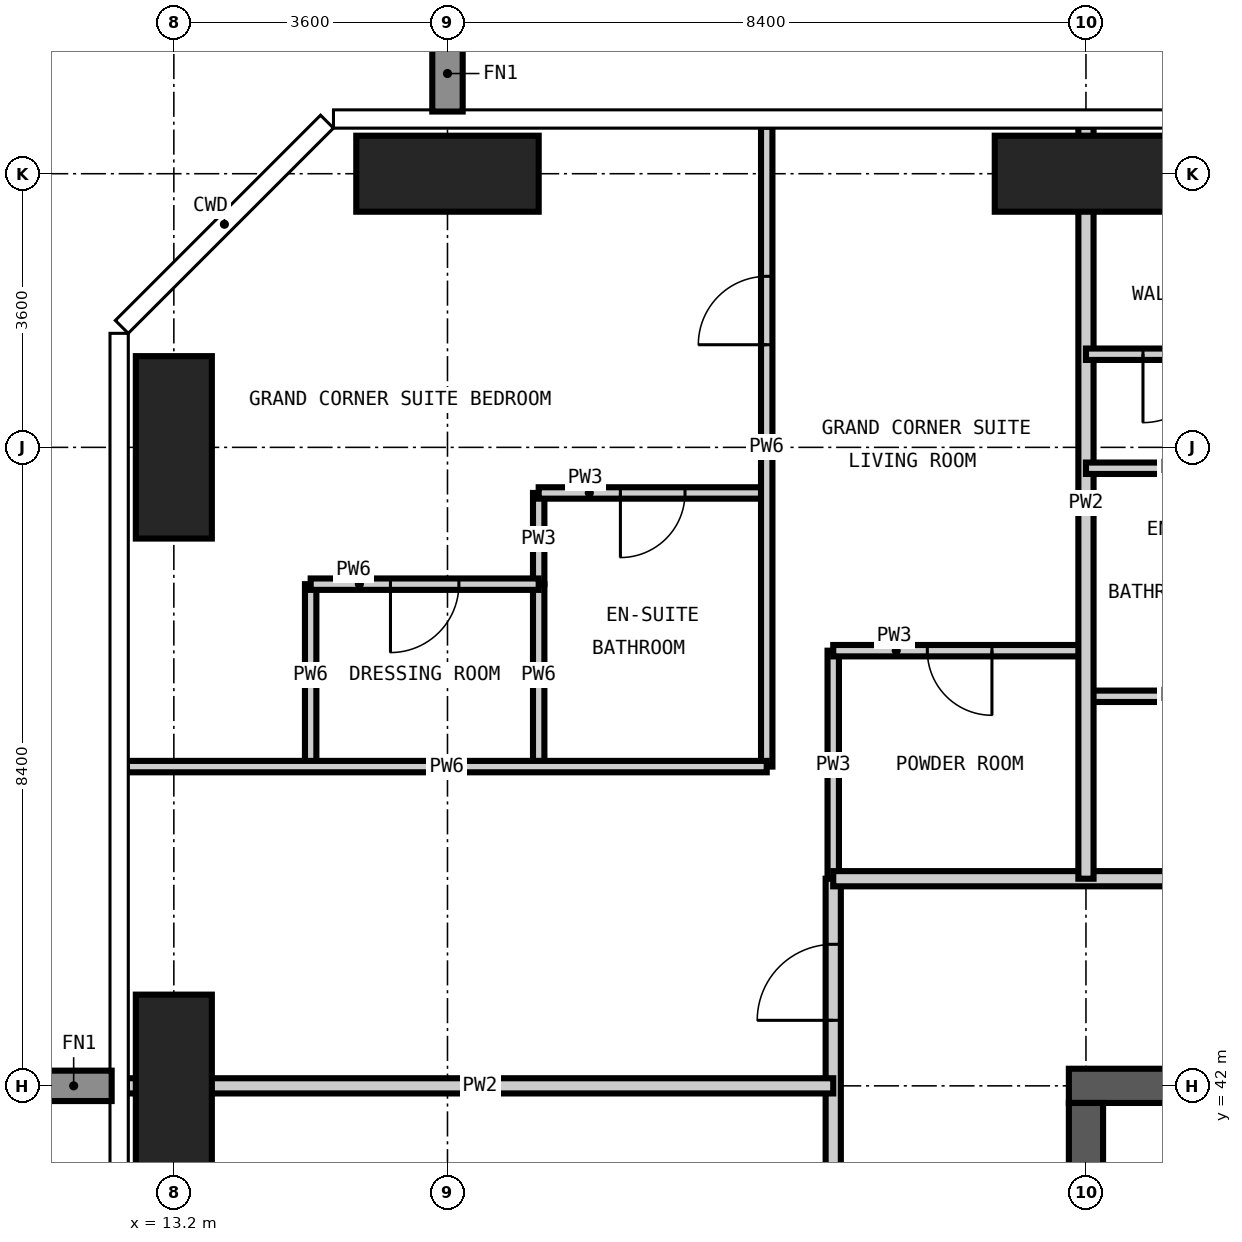
"""IFC4 building model, lengths in metres.
Left out: names, types, materials, properties, quantities, classifications, styles, units other than length and angle.
Written with IfcOpenShell. Run it as: python <this file> out.ifc"""

import sys

from ifc_helpers import new_model, si_unit, direction, frame, frame_2d, origin, origin_2d, place, context, subcontext, project, spatial, rectangle, extrude, element, fill, save


model = new_model("IFC4")
c1 = context("Model", 3, precision=1e-05, world=origin(), true_north=direction((0.0, 1.0)))
c2 = subcontext(c1, "Body", "Model", "MODEL_VIEW")
j1 = project(units=[si_unit("LENGTHUNIT", "METRE"), si_unit("PLANEANGLEUNIT", "RADIAN")], contexts=[c1])
p1 = place(None, origin())
s1 = spatial("IfcSite", under=j1, at=p1, CompositionType="ELEMENT")
p2 = place(p1, origin())
s2 = spatial("IfcBuilding", under=s1, at=p2, CompositionType="ELEMENT")
p3 = place(p2, frame((0.0, 0.0, 276.3)))
s3 = spatial("IfcBuildingStorey", under=s2, at=p3, CompositionType="ELEMENT", Elevation=276.3)
for number, where, z_axis, x_axis in (
    (1, (13.2, 42.0, -0.35), (0.0, 0.0, 1.0), (1.0, 0.0, 0.0)),
    (2, (13.2, 50.4, -0.35), (0.0, 0.0, 1.0), (1.0, 0.0, 0.0)),
):
    element("IfcColumn", number, at=place(p3, frame(where, z_axis=z_axis, x_axis=x_axis)), inside=s3, PredefinedType="COLUMN", context=c2, shape_type="SweptSolid", body=[
        extrude(rectangle(XDim=1.0, YDim=2.4, at=origin_2d()), origin(), (0.0, 0.0, 1.0), 3.9),
    ])
for number, where, z_axis, x_axis in (
    (3, (16.8, 54.0, -0.35), (0.0, 0.0, 1.0), (1.0, 0.0, 0.0)),
    (4, (25.2, 54.0, -0.35), (0.0, 0.0, 1.0), (1.0, 0.0, 0.0)),
):
    element("IfcColumn", number, at=place(p3, frame(where, z_axis=z_axis, x_axis=x_axis)), inside=s3, PredefinedType="COLUMN", context=c2, shape_type="SweptSolid", body=[
        extrude(rectangle(XDim=2.4, YDim=1.0, at=origin_2d()), origin(), (0.0, 0.0, 1.0), 3.9),
    ])
p4 = place(p3, frame((42.225, 42.0, -0.35), z_axis=(0.0, 0.0, 1.0), x_axis=(-1.0, 0.0, 0.0)))
e5 = element("IfcWall", 5, at=p4, inside=s3, PredefinedType="SHEAR", context=c2, shape_type="SweptSolid", body=[
    extrude(rectangle(XDim=17.25, YDim=0.45, at=frame_2d((8.625, 0.0))), origin(), (0.0, 0.0, 1.0), 3.9),
])
p5 = place(p4, frame((10.125, 0.0, 0.35)))
e6 = element("IfcOpeningElement", 6, at=p5, cuts=e5, PredefinedType="OPENING", context=c2, shape_type="SweptSolid", body=[
    extrude(rectangle(XDim=1.2, YDim=2.2, at=frame_2d((0.6, 1.1))), frame((0.0, 0.235, 0.0), z_axis=(0.0, -1.0, 0.0), x_axis=(1.0, 0.0, 0.0)), (0.0, 0.0, 1.0), 0.47),
])
p6 = place(p3, frame((25.2, 41.775, -0.35), z_axis=(0.0, 0.0, 1.0), x_axis=(0.0, -1.0, 0.0)))
e7 = element("IfcWall", 7, at=p6, inside=s3, PredefinedType="SHEAR", context=c2, shape_type="SweptSolid", body=[
    extrude(rectangle(XDim=24.75, YDim=0.45, at=frame_2d((12.375, 0.0))), origin(), (0.0, 0.0, 1.0), 3.9),
])
p7 = place(p6, frame((11.875, 0.0, 0.35)))
e8 = element("IfcOpeningElement", 8, at=p7, cuts=e7, PredefinedType="OPENING", context=c2, shape_type="SweptSolid", body=[
    extrude(rectangle(XDim=1.0, YDim=2.1, at=frame_2d((0.5, 1.05))), frame((0.0, 0.235, 0.0), z_axis=(0.0, -1.0, 0.0), x_axis=(1.0, 0.0, 0.0)), (0.0, 0.0, 1.0), 0.47),
])
p8 = place(p3, frame((18.0, 48.6, 0.0), z_axis=(0.0, 0.0, 1.0), x_axis=(0.0, 1.0, 0.0)))
e9 = element("IfcWall", 9, at=p8, inside=s3, PredefinedType="PARTITIONING", context=c2, shape_type="SweptSolid", body=[
    extrude(rectangle(XDim=1.2, YDim=0.15, at=frame_2d((0.6, 0.0))), origin(), (0.0, 0.0, 1.0), 3.55),
])
p9 = place(p3, frame((21.875, 44.725, 0.0), z_axis=(0.0, 0.0, 1.0), x_axis=(0.0, 1.0, 0.0)))
e10 = element("IfcWall", 10, at=p9, inside=s3, PredefinedType="PARTITIONING", context=c2, shape_type="SweptSolid", body=[
    extrude(rectangle(XDim=3.0, YDim=0.15, at=frame_2d((1.5, 0.0))), origin(), (0.0, 0.0, 1.0), 3.55),
])
p10 = place(p3, frame((25.2, 47.125, 0.0), z_axis=(0.0, 0.0, 1.0), x_axis=(1.0, 0.0, 0.0)))
e11 = element("IfcWall", 11, at=p10, inside=s3, PredefinedType="PARTITIONING", context=c2, shape_type="SweptSolid", body=[
    extrude(rectangle(XDim=2.4, YDim=0.15, at=frame_2d((1.2, 0.0))), origin(), (0.0, 0.0, 1.0), 3.55),
])
p11 = place(p3, frame((21.875, 47.725, 0.0), z_axis=(0.0, 0.0, 1.0), x_axis=(1.0, 0.0, 0.0)))
e12 = element("IfcWall", 12, at=p11, inside=s3, PredefinedType="PARTITIONING", context=c2, shape_type="SweptSolid", body=[
    extrude(rectangle(XDim=3.325, YDim=0.15, at=frame_2d((1.663, 0.0))), origin(), (0.0, 0.0, 1.0), 3.55),
])
p12 = place(p11, frame((1.238, 0.0, 0.0)))
e13 = element("IfcOpeningElement", 13, at=p12, cuts=e12, PredefinedType="OPENING", context=c2, shape_type="SweptSolid", body=[
    extrude(rectangle(XDim=0.85, YDim=2.1, at=frame_2d((0.425, 1.05))), frame((0.0, 0.085, 0.0), z_axis=(0.0, -1.0, 0.0), x_axis=(1.0, 0.0, 0.0)), (0.0, 0.0, 1.0), 0.17),
])
p13 = place(p3, frame((18.0, 49.8, 0.0), z_axis=(0.0, 0.0, 1.0), x_axis=(1.0, 0.0, 0.0)))
e14 = element("IfcWall", 14, at=p13, inside=s3, PredefinedType="PARTITIONING", context=c2, shape_type="SweptSolid", body=[
    extrude(rectangle(XDim=3.0, YDim=0.15, at=frame_2d((1.5, 0.0))), origin(), (0.0, 0.0, 1.0), 3.55),
])
p14 = place(p13, frame((1.075, 0.0, 0.0)))
e15 = element("IfcOpeningElement", 15, at=p14, cuts=e14, PredefinedType="OPENING", context=c2, shape_type="SweptSolid", body=[
    extrude(rectangle(XDim=0.85, YDim=2.1, at=frame_2d((0.425, 1.05))), frame((0.0, 0.085, 0.0), z_axis=(0.0, -1.0, 0.0), x_axis=(1.0, 0.0, 0.0)), (0.0, 0.0, 1.0), 0.17),
])
p15 = place(p3, frame((21.875, 13.475, 0.0), z_axis=(0.0, 0.0, 1.0), x_axis=(0.0, 1.0, 0.0)))
e16 = element("IfcWall", 16, at=p15, inside=s3, PredefinedType="PARTITIONING", context=c2, shape_type="SweptSolid", body=[
    extrude(rectangle(XDim=31.25, YDim=0.2, at=frame_2d((15.625, 0.0))), origin(), (0.0, 0.0, 1.0), 3.55),
])
p16 = place(p15, frame((4.925, 0.0, 0.0)))
e17 = element("IfcOpeningElement", 17, at=p16, cuts=e16, PredefinedType="OPENING", context=c2, shape_type="SweptSolid", body=[
    extrude(rectangle(XDim=1.0, YDim=2.2, at=frame_2d((0.5, 1.1))), frame((0.0, 0.11, 0.0), z_axis=(0.0, -1.0, 0.0), x_axis=(1.0, 0.0, 0.0)), (0.0, 0.0, 1.0), 0.22),
])
p17 = place(p15, frame((11.225, 0.0, 0.0)))
e18 = element("IfcOpeningElement", 18, at=p17, cuts=e16, PredefinedType="OPENING", context=c2, shape_type="SweptSolid", body=[
    extrude(rectangle(XDim=1.0, YDim=2.2, at=frame_2d((0.5, 1.1))), frame((0.0, 0.11, 0.0), z_axis=(0.0, -1.0, 0.0), x_axis=(1.0, 0.0, 0.0)), (0.0, 0.0, 1.0), 0.22),
])
p18 = place(p15, frame((19.625, 0.0, 0.0)))
e19 = element("IfcOpeningElement", 19, at=p18, cuts=e16, PredefinedType="OPENING", context=c2, shape_type="SweptSolid", body=[
    extrude(rectangle(XDim=1.0, YDim=2.2, at=frame_2d((0.5, 1.1))), frame((0.0, 0.11, 0.0), z_axis=(0.0, -1.0, 0.0), x_axis=(1.0, 0.0, 0.0)), (0.0, 0.0, 1.0), 0.22),
])
p19 = place(p15, frame((25.925, 0.0, 0.0)))
e20 = element("IfcOpeningElement", 20, at=p19, cuts=e16, PredefinedType="OPENING", context=c2, shape_type="SweptSolid", body=[
    extrude(rectangle(XDim=1.0, YDim=2.2, at=frame_2d((0.5, 1.1))), frame((0.0, 0.11, 0.0), z_axis=(0.0, -1.0, 0.0), x_axis=(1.0, 0.0, 0.0)), (0.0, 0.0, 1.0), 0.22),
])
p20 = place(p15, frame((1.162, 0.0, 0.0)))
e21 = element("IfcOpeningElement", 21, at=p20, cuts=e16, PredefinedType="OPENING", context=c2, shape_type="SweptSolid", body=[
    extrude(rectangle(XDim=1.0, YDim=2.2, at=frame_2d((0.5, 1.1))), frame((0.0, 0.11, 0.0), z_axis=(0.0, -1.0, 0.0), x_axis=(1.0, 0.0, 0.0)), (0.0, 0.0, 1.0), 0.22),
])
p21 = place(p15, frame((29.387, 0.0, 0.0)))
e22 = element("IfcOpeningElement", 22, at=p21, cuts=e16, PredefinedType="OPENING", context=c2, shape_type="SweptSolid", body=[
    extrude(rectangle(XDim=1.0, YDim=2.2, at=frame_2d((0.5, 1.1))), frame((0.0, 0.11, 0.0), z_axis=(0.0, -1.0, 0.0), x_axis=(1.0, 0.0, 0.0)), (0.0, 0.0, 1.0), 0.22),
])
p22 = place(p3, frame((21.875, 44.725, 0.0), z_axis=(0.0, 0.0, 1.0), x_axis=(1.0, 0.0, 0.0)))
e23 = element("IfcWall", 23, at=p22, inside=s3, PredefinedType="PARTITIONING", context=c2, shape_type="SweptSolid", body=[
    extrude(rectangle(XDim=22.25, YDim=0.2, at=frame_2d((11.125, 0.0))), origin(), (0.0, 0.0, 1.0), 3.55),
])
p23 = place(p22, frame((10.025, 0.0, 0.0)))
e24 = element("IfcOpeningElement", 24, at=p23, cuts=e23, PredefinedType="OPENING", context=c2, shape_type="SweptSolid", body=[
    extrude(rectangle(XDim=1.0, YDim=2.2, at=frame_2d((0.5, 1.1))), frame((0.0, 0.11, 0.0), z_axis=(0.0, -1.0, 0.0), x_axis=(1.0, 0.0, 0.0)), (0.0, 0.0, 1.0), 0.22),
])
p24 = place(p3, frame((25.2, 44.725, 0.0), z_axis=(0.0, 0.0, 1.0), x_axis=(0.0, 1.0, 0.0)))
e25 = element("IfcWall", 25, at=p24, inside=s3, PredefinedType="PARTITIONING", context=c2, shape_type="SweptSolid", body=[
    extrude(rectangle(XDim=9.893, YDim=0.2, at=frame_2d((4.946, 0.0))), origin(), (0.0, 0.0, 1.0), 3.55),
])
p25 = place(p3, frame((12.582, 42.0, 0.0), z_axis=(0.0, 0.0, 1.0), x_axis=(1.0, 0.0, 0.0)))
e26 = element("IfcWall", 26, at=p25, inside=s3, PredefinedType="PARTITIONING", context=c2, shape_type="SweptSolid", body=[
    extrude(rectangle(XDim=9.293, YDim=0.2, at=frame_2d((4.646, 0.0))), origin(), (0.0, 0.0, 1.0), 3.55),
])
for number, where, z_axis, x_axis in (
    (27, (15.0, 46.2, 0.0), (0.0, 0.0, 1.0), (0.0, 1.0, 0.0)),
    (28, (18.0, 46.2, 0.0), (0.0, 0.0, 1.0), (0.0, 1.0, 0.0)),
):
    element("IfcWall", number, at=place(p3, frame(where, z_axis=z_axis, x_axis=x_axis)), inside=s3, PredefinedType="PARTITIONING", context=c2, shape_type="SweptSolid", body=[
        extrude(rectangle(XDim=2.4, YDim=0.15, at=frame_2d((1.2, 0.0))), origin(), (0.0, 0.0, 1.0), 3.55),
    ])
p26 = place(p3, frame((21.0, 46.2, 0.0), z_axis=(0.0, 0.0, 1.0), x_axis=(0.0, 1.0, 0.0)))
e29 = element("IfcWall", 29, at=p26, inside=s3, PredefinedType="PARTITIONING", context=c2, shape_type="SweptSolid", body=[
    extrude(rectangle(XDim=8.418, YDim=0.15, at=frame_2d((4.209, 0.0))), origin(), (0.0, 0.0, 1.0), 3.55),
])
p27 = place(p26, frame((5.55, 0.0, 0.0)))
e30 = element("IfcOpeningElement", 30, at=p27, cuts=e29, PredefinedType="OPENING", context=c2, shape_type="SweptSolid", body=[
    extrude(rectangle(XDim=0.9, YDim=2.1, at=frame_2d((0.45, 1.05))), frame((0.0, 0.085, 0.0), z_axis=(0.0, -1.0, 0.0), x_axis=(1.0, 0.0, 0.0)), (0.0, 0.0, 1.0), 0.17),
])
p28 = place(p3, frame((12.582, 46.2, 0.0), z_axis=(0.0, 0.0, 1.0), x_axis=(1.0, 0.0, 0.0)))
e31 = element("IfcWall", 31, at=p28, inside=s3, PredefinedType="PARTITIONING", context=c2, shape_type="SweptSolid", body=[
    extrude(rectangle(XDim=8.418, YDim=0.15, at=frame_2d((4.209, 0.0))), origin(), (0.0, 0.0, 1.0), 3.55),
])
p29 = place(p3, frame((15.0, 48.6, 0.0), z_axis=(0.0, 0.0, 1.0), x_axis=(1.0, 0.0, 0.0)))
e32 = element("IfcWall", 32, at=p29, inside=s3, PredefinedType="PARTITIONING", context=c2, shape_type="SweptSolid", body=[
    extrude(rectangle(XDim=3.0, YDim=0.15, at=frame_2d((1.5, 0.0))), origin(), (0.0, 0.0, 1.0), 3.55),
])
p30 = place(p29, frame((1.05, 0.0, 0.0)))
e33 = element("IfcOpeningElement", 33, at=p30, cuts=e32, PredefinedType="OPENING", context=c2, shape_type="SweptSolid", body=[
    extrude(rectangle(XDim=0.9, YDim=2.1, at=frame_2d((0.45, 1.05))), frame((0.0, 0.085, 0.0), z_axis=(0.0, -1.0, 0.0), x_axis=(1.0, 0.0, 0.0)), (0.0, 0.0, 1.0), 0.17),
])
p31 = place(p3, frame((25.2, 50.125, 0.0), z_axis=(0.0, 0.0, 1.0), x_axis=(1.0, 0.0, 0.0)))
e34 = element("IfcWall", 34, at=p31, inside=s3, PredefinedType="PARTITIONING", context=c2, shape_type="SweptSolid", body=[
    extrude(rectangle(XDim=2.4, YDim=0.15, at=frame_2d((1.2, 0.0))), origin(), (0.0, 0.0, 1.0), 3.55),
])
p32 = place(p3, frame((25.2, 51.625, 0.0), z_axis=(0.0, 0.0, 1.0), x_axis=(1.0, 0.0, 0.0)))
e35 = element("IfcWall", 35, at=p32, inside=s3, PredefinedType="PARTITIONING", context=c2, shape_type="SweptSolid", body=[
    extrude(rectangle(XDim=2.4, YDim=0.15, at=frame_2d((1.2, 0.0))), origin(), (0.0, 0.0, 1.0), 3.55),
])
p33 = place(p32, frame((0.75, 0.0, 0.0)))
e36 = element("IfcOpeningElement", 36, at=p33, cuts=e35, PredefinedType="OPENING", context=c2, shape_type="SweptSolid", body=[
    extrude(rectangle(XDim=0.9, YDim=2.1, at=frame_2d((0.45, 1.05))), frame((0.0, 0.085, 0.0), z_axis=(0.0, -1.0, 0.0), x_axis=(1.0, 0.0, 0.0)), (0.0, 0.0, 1.0), 0.17),
])
p34 = place(p33, frame((0.9, 0.0, 0.0), z_axis=(0.0, 0.0, 1.0), x_axis=(-1.0, 0.0, 0.0)))
e37 = element("IfcDoor", 37, at=p34, inside=s3, OperationType="SINGLE_SWING_RIGHT", PredefinedType="DOOR", context=c2, shape_type="SweptSolid", body=[
    extrude(rectangle(XDim=0.9, YDim=2.1, at=frame_2d((0.45, 1.05))), frame((0.0, 0.025, 0.0), z_axis=(0.0, -1.0, 0.0), x_axis=(1.0, 0.0, 0.0)), (0.0, 0.0, 1.0), 0.05),
])
fill(e36, e37)
p35 = place(p21, origin())
e38 = element("IfcDoor", 38, at=p35, inside=s3, OperationType="SINGLE_SWING_LEFT", PredefinedType="DOOR", context=c2, shape_type="SweptSolid", body=[
    extrude(rectangle(XDim=1.0, YDim=2.2, at=frame_2d((0.5, 1.1))), frame((0.0, 0.025, 0.0), z_axis=(0.0, -1.0, 0.0), x_axis=(1.0, 0.0, 0.0)), (0.0, 0.0, 1.0), 0.05),
])
fill(e22, e38)
p36 = place(p12, frame((0.85, 0.0, 0.0), z_axis=(0.0, 0.0, 1.0), x_axis=(-1.0, 0.0, 0.0)))
e39 = element("IfcDoor", 39, at=p36, inside=s3, OperationType="SINGLE_SWING_LEFT", PredefinedType="DOOR", context=c2, shape_type="SweptSolid", body=[
    extrude(rectangle(XDim=0.85, YDim=2.1, at=frame_2d((0.425, 1.05))), frame((0.0, 0.025, 0.0), z_axis=(0.0, -1.0, 0.0), x_axis=(1.0, 0.0, 0.0)), (0.0, 0.0, 1.0), 0.05),
])
fill(e13, e39)
p37 = place(p27, origin())
e40 = element("IfcDoor", 40, at=p37, inside=s3, OperationType="SINGLE_SWING_LEFT", PredefinedType="DOOR", context=c2, shape_type="SweptSolid", body=[
    extrude(rectangle(XDim=0.9, YDim=2.1, at=frame_2d((0.45, 1.05))), frame((0.0, 0.025, 0.0), z_axis=(0.0, -1.0, 0.0), x_axis=(1.0, 0.0, 0.0)), (0.0, 0.0, 1.0), 0.05),
])
fill(e30, e40)
p38 = place(p14, frame((0.85, 0.0, 0.0), z_axis=(0.0, 0.0, 1.0), x_axis=(-1.0, 0.0, 0.0)))
e41 = element("IfcDoor", 41, at=p38, inside=s3, OperationType="SINGLE_SWING_RIGHT", PredefinedType="DOOR", context=c2, shape_type="SweptSolid", body=[
    extrude(rectangle(XDim=0.85, YDim=2.1, at=frame_2d((0.425, 1.05))), frame((0.0, 0.025, 0.0), z_axis=(0.0, -1.0, 0.0), x_axis=(1.0, 0.0, 0.0)), (0.0, 0.0, 1.0), 0.05),
])
fill(e15, e41)
p39 = place(p30, frame((0.9, 0.0, 0.0), z_axis=(0.0, 0.0, 1.0), x_axis=(-1.0, 0.0, 0.0)))
e42 = element("IfcDoor", 42, at=p39, inside=s3, OperationType="SINGLE_SWING_RIGHT", PredefinedType="DOOR", context=c2, shape_type="SweptSolid", body=[
    extrude(rectangle(XDim=0.9, YDim=2.1, at=frame_2d((0.45, 1.05))), frame((0.0, 0.025, 0.0), z_axis=(0.0, -1.0, 0.0), x_axis=(1.0, 0.0, 0.0)), (0.0, 0.0, 1.0), 0.05),
])
fill(e33, e42)
save(model, sys.argv[1])
